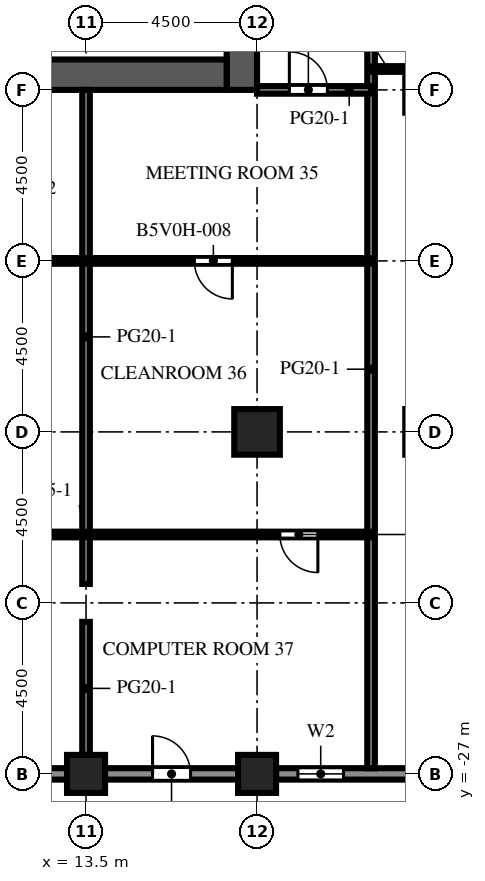
"""IFC4 building model, lengths in metres.
Left out: names, types, materials, properties, quantities, classifications, styles, units other than length and angle.
Written with IfcOpenShell. Run it as: python <this file> out.ifc"""

import sys

from ifc_helpers import new_model, si_unit, direction, frame, frame_2d, origin, origin_2d, place, context, subcontext, project, spatial, rectangle, extrude, element, fill, save


model = new_model("IFC4")
c1 = context("Model", 3, precision=1e-05, world=origin(), true_north=direction((0.0, 1.0)))
c2 = subcontext(c1, "Body", "Model", "MODEL_VIEW")
j1 = project(units=[si_unit("LENGTHUNIT", "METRE"), si_unit("PLANEANGLEUNIT", "RADIAN")], contexts=[c1])
p1 = place(None, origin())
s1 = spatial("IfcSite", under=j1, at=p1, CompositionType="ELEMENT")
p2 = place(p1, origin())
s2 = spatial("IfcBuilding", under=s1, at=p2, CompositionType="ELEMENT")
p3 = place(p2, frame((0.0, 0.0, 156.8)))
s3 = spatial("IfcBuildingStorey", under=s2, at=p3, CompositionType="ELEMENT", Elevation=156.8)
for number, where, z_axis, x_axis in (
    (1, (13.5, -27.0, -0.45), (0.0, 0.0, 1.0), (1.0, 0.0, 0.0)),
    (2, (18.0, -27.0, -0.45), (0.0, 0.0, 1.0), (1.0, 0.0, 0.0)),
):
    element("IfcColumn", number, at=place(p3, frame(where, z_axis=z_axis, x_axis=x_axis)), inside=s3, PredefinedType="COLUMN", context=c2, shape_type="SweptSolid", body=[
        extrude(rectangle(XDim=1.0, YDim=1.0, at=origin_2d()), origin(), (0.0, 0.0, 1.0), 4.55),
    ])
p4 = place(p3, frame((18.0, -18.0, -0.45), z_axis=(0.0, 0.0, 1.0), x_axis=(1.0, 0.0, 0.0)))
e3 = element("IfcColumn", 3, at=p4, inside=s3, PredefinedType="COLUMN", context=c2, shape_type="SweptSolid", body=[
    extrude(rectangle(XDim=1.2, YDim=1.2, at=origin_2d()), origin(), (0.0, 0.0, 1.0), 4.55),
])
p5 = place(p3, frame((17.6, -9.0, 0.0), z_axis=(0.0, 0.0, 1.0), x_axis=(0.0, 1.0, 0.0)))
e4 = element("IfcWall", 4, at=p5, inside=s3, PredefinedType="SHEAR", context=c2, shape_type="SweptSolid", body=[
    extrude(rectangle(XDim=27.5, YDim=0.8, at=frame_2d((13.75, 0.0))), origin(), (0.0, 0.0, 1.0), 4.1),
])
p6 = place(p5, frame((12.55, 0.0, 0.0)))
e5 = element("IfcOpeningElement", 5, at=p6, cuts=e4, PredefinedType="OPENING", context=c2, shape_type="SweptSolid", body=[
    extrude(rectangle(XDim=2.4, YDim=2.4, at=frame_2d((1.2, 1.2))), frame((0.0, 0.41, 0.0), z_axis=(0.0, -1.0, 0.0), x_axis=(1.0, 0.0, 0.0)), (0.0, 0.0, 1.0), 0.82),
])
p7 = place(p5, frame((6.825, 0.0, 0.0)))
e6 = element("IfcOpeningElement", 6, at=p7, cuts=e4, PredefinedType="OPENING", context=c2, shape_type="SweptSolid", body=[
    extrude(rectangle(XDim=1.2, YDim=2.1, at=frame_2d((0.6, 1.05))), frame((0.0, 0.41, 0.0), z_axis=(0.0, -1.0, 0.0), x_axis=(1.0, 0.0, 0.0)), (0.0, 0.0, 1.0), 0.82),
])
p8 = place(p5, frame((19.475, 0.0, 0.0)))
e7 = element("IfcOpeningElement", 7, at=p8, cuts=e4, PredefinedType="OPENING", context=c2, shape_type="SweptSolid", body=[
    extrude(rectangle(XDim=1.2, YDim=2.1, at=frame_2d((0.6, 1.05))), frame((0.0, 0.41, 0.0), z_axis=(0.0, -1.0, 0.0), x_axis=(1.0, 0.0, 0.0)), (0.0, 0.0, 1.0), 0.82),
])
p9 = place(p3, frame((6.8, -8.6, 0.0), z_axis=(0.0, 0.0, 1.0), x_axis=(1.0, 0.0, 0.0)))
e8 = element("IfcWall", 8, at=p9, inside=s3, PredefinedType="SHEAR", context=c2, shape_type="SweptSolid", body=[
    extrude(rectangle(XDim=10.4, YDim=0.8, at=frame_2d((5.2, 0.0))), origin(), (0.0, 0.0, 1.0), 4.1),
])
p10 = place(p3, frame((13.0, -27.0, 0.0), z_axis=(0.0, 0.0, 1.0), x_axis=(-1.0, 0.0, 0.0)))
e9 = element("IfcWall", 9, at=p10, inside=s3, PredefinedType="SOLIDWALL", context=c2, shape_type="SweptSolid", body=[
    extrude(rectangle(XDim=3.5, YDim=0.3, at=frame_2d((1.75, 0.0))), origin(), (0.0, 0.0, 1.0), 2.85),
])
p11 = place(p10, frame((0.55, 0.0, 0.8)))
e10 = element("IfcOpeningElement", 10, at=p11, cuts=e9, PredefinedType="OPENING", context=c2, shape_type="SweptSolid", body=[
    extrude(rectangle(XDim=2.4, YDim=1.7, at=frame_2d((1.2, 0.85))), frame((0.0, 0.16, 0.0), z_axis=(0.0, -1.0, 0.0), x_axis=(1.0, 0.0, 0.0)), (0.0, 0.0, 1.0), 0.32),
])
p12 = place(p3, frame((17.5, -27.0, 0.0), z_axis=(0.0, 0.0, 1.0), x_axis=(-1.0, 0.0, 0.0)))
e11 = element("IfcWall", 11, at=p12, inside=s3, PredefinedType="SOLIDWALL", context=c2, shape_type="SweptSolid", body=[
    extrude(rectangle(XDim=3.5, YDim=0.3, at=frame_2d((1.75, 0.0))), origin(), (0.0, 0.0, 1.0), 2.85),
])
p13 = place(p12, frame((1.25, 0.0, 0.0)))
e12 = element("IfcOpeningElement", 12, at=p13, cuts=e11, PredefinedType="OPENING", context=c2, shape_type="SweptSolid", body=[
    extrude(rectangle(XDim=1.0, YDim=2.2, at=frame_2d((0.5, 1.1))), frame((0.0, 0.16, 0.0), z_axis=(0.0, -1.0, 0.0), x_axis=(1.0, 0.0, 0.0)), (0.0, 0.0, 1.0), 0.32),
])
p14 = place(p3, frame((22.0, -27.0, 0.0), z_axis=(0.0, 0.0, 1.0), x_axis=(-1.0, 0.0, 0.0)))
e13 = element("IfcWall", 13, at=p14, inside=s3, PredefinedType="SOLIDWALL", context=c2, shape_type="SweptSolid", body=[
    extrude(rectangle(XDim=3.5, YDim=0.3, at=frame_2d((1.75, 0.0))), origin(), (0.0, 0.0, 1.0), 2.85),
])
p15 = place(p14, frame((1.725, 0.0, 0.8)))
e14 = element("IfcOpeningElement", 14, at=p15, cuts=e13, PredefinedType="OPENING", context=c2, shape_type="SweptSolid", body=[
    extrude(rectangle(XDim=1.2, YDim=1.7, at=frame_2d((0.6, 0.85))), frame((0.0, 0.16, 0.0), z_axis=(0.0, -1.0, 0.0), x_axis=(1.0, 0.0, 0.0)), (0.0, 0.0, 1.0), 0.32),
])
p16 = place(p3, frame((13.5, -26.5, 0.0), z_axis=(0.0, 0.0, 1.0), x_axis=(0.0, 1.0, 0.0)))
e15 = element("IfcWall", 15, at=p16, inside=s3, PredefinedType="PARTITIONING", context=c2, shape_type="SweptSolid", body=[
    extrude(rectangle(XDim=3.5, YDim=0.2, at=frame_2d((1.75, 0.0))), origin(), (0.0, 0.0, 1.0), 3.65),
])
p17 = place(p3, frame((13.5, -22.0, 0.0), z_axis=(0.0, 0.0, 1.0), x_axis=(0.0, 1.0, 0.0)))
e16 = element("IfcWall", 16, at=p17, inside=s3, PredefinedType="PARTITIONING", context=c2, shape_type="SweptSolid", body=[
    extrude(rectangle(XDim=13.0, YDim=0.2, at=frame_2d((6.5, 0.0))), origin(), (0.0, 0.0, 1.0), 3.65),
])
p18 = place(p3, frame((21.0, 3.25, 0.0), z_axis=(0.0, 0.0, 1.0), x_axis=(0.0, -1.0, 0.0)))
e17 = element("IfcWall", 17, at=p18, inside=s3, PredefinedType="PARTITIONING", context=c2, shape_type="SweptSolid", body=[
    extrude(rectangle(XDim=30.1, YDim=0.2, at=frame_2d((15.05, 0.0))), origin(), (0.0, 0.0, 1.0), 3.65),
])
p19 = place(p18, frame((8.1, 0.0, 0.0)))
e18 = element("IfcOpeningElement", 18, at=p19, cuts=e17, PredefinedType="OPENING", context=c2, shape_type="SweptSolid", body=[
    extrude(rectangle(XDim=1.0, YDim=2.1, at=frame_2d((0.5, 1.05))), frame((0.0, 0.11, 0.0), z_axis=(0.0, -1.0, 0.0), x_axis=(1.0, 0.0, 0.0)), (0.0, 0.0, 1.0), 0.22),
])
p20 = place(p3, frame((21.0, -20.7, 0.0), z_axis=(0.0, 0.0, 1.0), x_axis=(-1.0, 0.0, 0.0)))
e19 = element("IfcWall", 19, at=p20, inside=s3, PredefinedType="PARTITIONING", context=c2, shape_type="SweptSolid", body=[
    extrude(rectangle(XDim=34.5, YDim=0.15, at=frame_2d((17.25, 0.0))), origin(), (0.0, 0.0, 1.0), 3.65),
])
p21 = place(p20, frame((26.9, 0.0, 0.0)))
e20 = element("IfcOpeningElement", 20, at=p21, cuts=e19, PredefinedType="OPENING", context=c2, shape_type="SweptSolid", body=[
    extrude(rectangle(XDim=1.0, YDim=2.1, at=frame_2d((0.5, 1.05))), frame((0.0, 0.085, 0.0), z_axis=(0.0, -1.0, 0.0), x_axis=(1.0, 0.0, 0.0)), (0.0, 0.0, 1.0), 0.17),
])
p22 = place(p20, frame((18.25, 0.0, 0.0)))
e21 = element("IfcOpeningElement", 21, at=p22, cuts=e19, PredefinedType="OPENING", context=c2, shape_type="SweptSolid", body=[
    extrude(rectangle(XDim=1.0, YDim=2.1, at=frame_2d((0.5, 1.05))), frame((0.0, 0.085, 0.0), z_axis=(0.0, -1.0, 0.0), x_axis=(1.0, 0.0, 0.0)), (0.0, 0.0, 1.0), 0.17),
])
p23 = place(p20, frame((12.65, 0.0, 0.0)))
e22 = element("IfcOpeningElement", 22, at=p23, cuts=e19, PredefinedType="OPENING", context=c2, shape_type="SweptSolid", body=[
    extrude(rectangle(XDim=1.0, YDim=2.1, at=frame_2d((0.5, 1.05))), frame((0.0, 0.085, 0.0), z_axis=(0.0, -1.0, 0.0), x_axis=(1.0, 0.0, 0.0)), (0.0, 0.0, 1.0), 0.17),
])
p24 = place(p20, frame((1.4, 0.0, 0.0)))
e23 = element("IfcOpeningElement", 23, at=p24, cuts=e19, PredefinedType="OPENING", context=c2, shape_type="SweptSolid", body=[
    extrude(rectangle(XDim=1.0, YDim=2.1, at=frame_2d((0.5, 1.05))), frame((0.0, 0.085, 0.0), z_axis=(0.0, -1.0, 0.0), x_axis=(1.0, 0.0, 0.0)), (0.0, 0.0, 1.0), 0.17),
])
p25 = place(p3, frame((21.0, -13.5, 0.0), z_axis=(0.0, 0.0, 1.0), x_axis=(-1.0, 0.0, 0.0)))
e24 = element("IfcWall", 24, at=p25, inside=s3, PredefinedType="PARTITIONING", context=c2, shape_type="SweptSolid", body=[
    extrude(rectangle(XDim=34.5, YDim=0.15, at=frame_2d((17.25, 0.0))), origin(), (0.0, 0.0, 1.0), 3.65),
])
p26 = place(p25, frame((27.4, 0.0, 0.0)))
e25 = element("IfcOpeningElement", 25, at=p26, cuts=e24, PredefinedType="OPENING", context=c2, shape_type="SweptSolid", body=[
    extrude(rectangle(XDim=1.0, YDim=2.1, at=frame_2d((0.5, 1.05))), frame((0.0, 0.085, 0.0), z_axis=(0.0, -1.0, 0.0), x_axis=(1.0, 0.0, 0.0)), (0.0, 0.0, 1.0), 0.17),
])
p27 = place(p25, frame((17.5, 0.0, 0.0)))
e26 = element("IfcOpeningElement", 26, at=p27, cuts=e24, PredefinedType="OPENING", context=c2, shape_type="SweptSolid", body=[
    extrude(rectangle(XDim=1.0, YDim=2.1, at=frame_2d((0.5, 1.05))), frame((0.0, 0.085, 0.0), z_axis=(0.0, -1.0, 0.0), x_axis=(1.0, 0.0, 0.0)), (0.0, 0.0, 1.0), 0.17),
])
p28 = place(p25, frame((10.4, 0.0, 0.0)))
e27 = element("IfcOpeningElement", 27, at=p28, cuts=e24, PredefinedType="OPENING", context=c2, shape_type="SweptSolid", body=[
    extrude(rectangle(XDim=1.0, YDim=2.1, at=frame_2d((0.5, 1.05))), frame((0.0, 0.085, 0.0), z_axis=(0.0, -1.0, 0.0), x_axis=(1.0, 0.0, 0.0)), (0.0, 0.0, 1.0), 0.17),
])
p29 = place(p25, frame((3.65, 0.0, 0.0)))
e28 = element("IfcOpeningElement", 28, at=p29, cuts=e24, PredefinedType="OPENING", context=c2, shape_type="SweptSolid", body=[
    extrude(rectangle(XDim=1.0, YDim=2.1, at=frame_2d((0.5, 1.05))), frame((0.0, 0.085, 0.0), z_axis=(0.0, -1.0, 0.0), x_axis=(1.0, 0.0, 0.0)), (0.0, 0.0, 1.0), 0.17),
])
p30 = place(p3, frame((21.0, -9.0, 0.0), z_axis=(0.0, 0.0, 1.0), x_axis=(-1.0, 0.0, 0.0)))
e29 = element("IfcWall", 29, at=p30, inside=s3, PredefinedType="PARTITIONING", context=c2, shape_type="SweptSolid", body=[
    extrude(rectangle(XDim=3.0, YDim=0.2, at=frame_2d((1.5, 0.0))), origin(), (0.0, 0.0, 1.0), 3.65),
])
p31 = place(p30, frame((1.15, 0.0, 0.0)))
e30 = element("IfcOpeningElement", 30, at=p31, cuts=e29, PredefinedType="OPENING", context=c2, shape_type="SweptSolid", body=[
    extrude(rectangle(XDim=1.0, YDim=2.1, at=frame_2d((0.5, 1.05))), frame((0.0, 0.11, 0.0), z_axis=(0.0, -1.0, 0.0), x_axis=(1.0, 0.0, 0.0)), (0.0, 0.0, 1.0), 0.22),
])
p32 = place(p3, frame((21.0, -8.45, 0.0), z_axis=(0.0, 0.0, 1.0), x_axis=(1.0, 0.0, 0.0)))
e31 = element("IfcWall", 31, at=p32, inside=s3, PredefinedType="PARTITIONING", context=c2, shape_type="SweptSolid", body=[
    extrude(rectangle(XDim=0.9, YDim=0.15, at=frame_2d((0.45, 0.0))), origin(), (0.0, 0.0, 1.0), 3.65),
])
p33 = place(p13, origin())
e32 = element("IfcDoor", 32, at=p33, inside=s3, OperationType="SINGLE_SWING_RIGHT", PredefinedType="DOOR", context=c2, shape_type="SweptSolid", body=[
    extrude(rectangle(XDim=1.0, YDim=2.2, at=frame_2d((0.5, 1.1))), frame((0.0, 0.025, 0.0), z_axis=(0.0, -1.0, 0.0), x_axis=(1.0, 0.0, 0.0)), (0.0, 0.0, 1.0), 0.05),
])
fill(e12, e32)
p34 = place(p15, origin())
e33 = element("IfcWindow", 33, at=p34, inside=s3, PartitioningType="SINGLE_PANEL", PredefinedType="WINDOW", context=c2, shape_type="SweptSolid", body=[
    extrude(rectangle(XDim=1.2, YDim=1.7, at=frame_2d((0.6, 0.85))), frame((0.0, 0.03, 0.0), z_axis=(0.0, -1.0, 0.0), x_axis=(1.0, 0.0, 0.0)), (0.0, 0.0, 1.0), 0.06),
])
fill(e14, e33)
p35 = place(p24, origin())
e34 = element("IfcDoor", 34, at=p35, inside=s3, OperationType="SINGLE_SWING_LEFT", PredefinedType="DOOR", context=c2, shape_type="SweptSolid", body=[
    extrude(rectangle(XDim=1.0, YDim=2.1, at=frame_2d((0.5, 1.05))), frame((0.0, 0.025, 0.0), z_axis=(0.0, -1.0, 0.0), x_axis=(1.0, 0.0, 0.0)), (0.0, 0.0, 1.0), 0.05),
])
fill(e23, e34)
p36 = place(p29, origin())
e35 = element("IfcDoor", 35, at=p36, inside=s3, OperationType="SINGLE_SWING_LEFT", PredefinedType="DOOR", context=c2, shape_type="SweptSolid", body=[
    extrude(rectangle(XDim=1.0, YDim=2.1, at=frame_2d((0.5, 1.05))), frame((0.0, 0.025, 0.0), z_axis=(0.0, -1.0, 0.0), x_axis=(1.0, 0.0, 0.0)), (0.0, 0.0, 1.0), 0.05),
])
fill(e28, e35)
p37 = place(p31, origin())
e36 = element("IfcDoor", 36, at=p37, inside=s3, OperationType="SINGLE_SWING_RIGHT", PredefinedType="DOOR", context=c2, shape_type="SweptSolid", body=[
    extrude(rectangle(XDim=1.0, YDim=2.1, at=frame_2d((0.5, 1.05))), frame((0.0, 0.025, 0.0), z_axis=(0.0, -1.0, 0.0), x_axis=(1.0, 0.0, 0.0)), (0.0, 0.0, 1.0), 0.05),
])
fill(e30, e36)
save(model, sys.argv[1])
